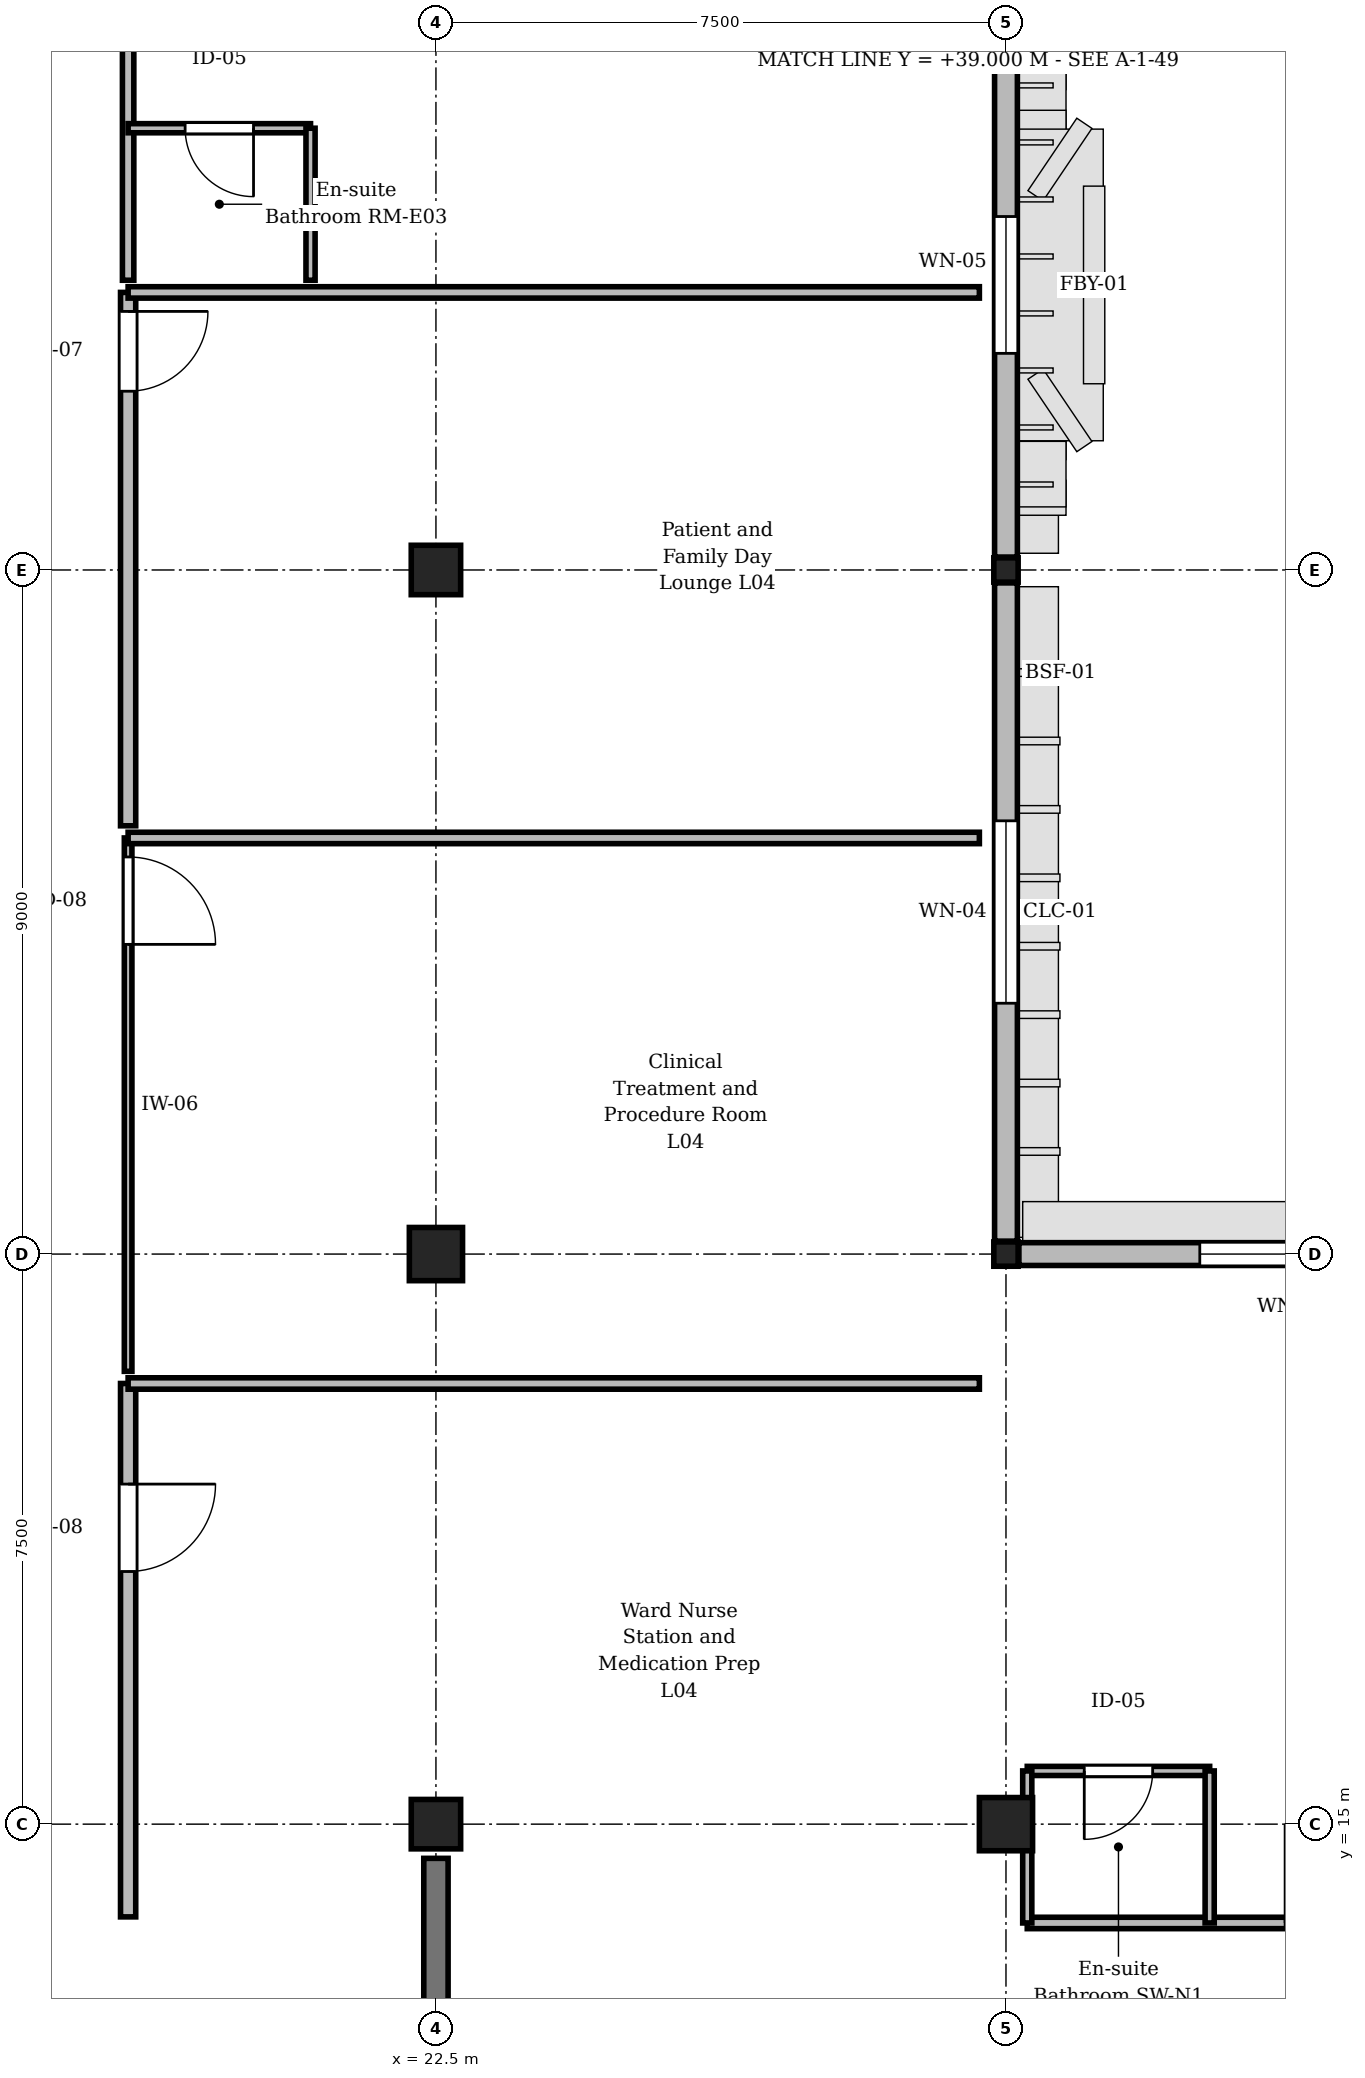
"""IFC4 building model, lengths in metres.
Left out: names, types, materials, properties, quantities, classifications, styles, units other than length and angle.
Written with IfcOpenShell. Run it as: python <this file> out.ifc"""

import sys

from ifc_helpers import new_model, si_unit, direction, frame, frame_2d, origin, origin_2d, place, context, subcontext, project, spatial, rectangle, extrude, element, fill, save


model = new_model("IFC4")
c1 = context("Model", 3, precision=1e-05, world=origin(), true_north=direction((0.0, 1.0)))
c2 = subcontext(c1, "Body", "Model", "MODEL_VIEW")
j1 = project(units=[si_unit("LENGTHUNIT", "METRE"), si_unit("PLANEANGLEUNIT", "RADIAN")], contexts=[c1])
p1 = place(None, origin())
s1 = spatial("IfcSite", under=j1, at=p1, CompositionType="ELEMENT")
p2 = place(p1, origin())
s2 = spatial("IfcBuilding", under=s1, at=p2, CompositionType="ELEMENT")
p3 = place(p2, frame((0.0, 0.0, 17.85)))
s3 = spatial("IfcBuildingStorey", under=s2, at=p3, CompositionType="ELEMENT", Elevation=17.85)
p4 = place(p3, frame((22.5, 15.0, 0.0), z_axis=(0.0, 0.0, 1.0), x_axis=(1.0, 0.0, 0.0)))
e1 = element("IfcColumn", 1, at=p4, inside=s3, PredefinedType="COLUMN", context=c2, shape_type="SweptSolid", body=[
    extrude(rectangle(XDim=0.65, YDim=0.65, at=origin_2d()), origin(), (0.0, 0.0, 1.0), 4.05),
])
p5 = place(p3, frame((22.5, 22.5, 0.0), z_axis=(0.0, 0.0, 1.0), x_axis=(1.0, 0.0, 0.0)))
e2 = element("IfcColumn", 2, at=p5, inside=s3, PredefinedType="COLUMN", context=c2, shape_type="SweptSolid", body=[
    extrude(rectangle(XDim=0.7, YDim=0.7, at=origin_2d()), origin(), (0.0, 0.0, 1.0), 4.05),
])
p6 = place(p3, frame((22.5, 31.5, 0.0), z_axis=(0.0, 0.0, 1.0), x_axis=(1.0, 0.0, 0.0)))
e3 = element("IfcColumn", 3, at=p6, inside=s3, PredefinedType="COLUMN", context=c2, shape_type="SweptSolid", body=[
    extrude(rectangle(XDim=0.65, YDim=0.65, at=origin_2d()), origin(), (0.0, 0.0, 1.0), 4.05),
])
p7 = place(p3, frame((30.0, 15.0, 0.0), z_axis=(0.0, 0.0, 1.0), x_axis=(1.0, 0.0, 0.0)))
e4 = element("IfcColumn", 4, at=p7, inside=s3, PredefinedType="COLUMN", context=c2, shape_type="SweptSolid", body=[
    extrude(rectangle(XDim=0.7, YDim=0.7, at=origin_2d()), origin(), (0.0, 0.0, 1.0), 4.05),
])
for number, where, z_axis, x_axis in (
    (5, (30.0, 22.5, 0.0), (0.0, 0.0, 1.0), (1.0, 0.0, 0.0)),
    (6, (30.0, 31.5, 0.0), (0.0, 0.0, 1.0), (1.0, 0.0, 0.0)),
):
    element("IfcColumn", number, at=place(p3, frame(where, z_axis=z_axis, x_axis=x_axis)), inside=s3, PredefinedType="COLUMN", context=c2, shape_type="SweptSolid", body=[
        extrude(rectangle(XDim=0.32, YDim=0.32, at=origin_2d()), origin(), (0.0, 0.0, 1.0), 4.05),
    ])
p8 = place(p3, frame((22.5, 7.95, 0.0), z_axis=(0.0, 0.0, 1.0), x_axis=(0.0, 1.0, 0.0)))
e7 = element("IfcWall", 7, at=p8, inside=s3, PredefinedType="SHEAR", context=c2, shape_type="SweptSolid", body=[
    extrude(rectangle(XDim=6.6, YDim=0.32, at=frame_2d((3.3, 0.0))), origin(), (0.0, 0.0, 1.0), 3.22),
])
p9 = place(p3, frame((30.0, 31.33, 0.0), z_axis=(0.0, 0.0, 1.0), x_axis=(0.0, -1.0, 0.0)))
e8 = element("IfcWall", 8, at=p9, inside=s3, PredefinedType="STANDARD", context=c2, shape_type="SweptSolid", body=[
    extrude(rectangle(XDim=8.66, YDim=0.3, at=frame_2d((4.33, 0.0))), origin(), (0.0, 0.0, 1.0), 3.22),
])
p10 = place(p9, frame((3.13, 0.0, 0.9)))
e9 = element("IfcOpeningElement", 9, at=p10, cuts=e8, PredefinedType="OPENING", context=c2, shape_type="SweptSolid", body=[
    extrude(rectangle(XDim=2.4, YDim=2.04, at=frame_2d((1.2, 1.02))), frame((0.0, 0.16, 0.0), z_axis=(0.0, -1.0, 0.0), x_axis=(1.0, 0.0, 0.0)), (0.0, 0.0, 1.0), 0.32),
])
p11 = place(p3, frame((30.0, 38.83, 0.0), z_axis=(0.0, 0.0, 1.0), x_axis=(0.0, -1.0, 0.0)))
e10 = element("IfcWall", 10, at=p11, inside=s3, PredefinedType="STANDARD", context=c2, shape_type="SweptSolid", body=[
    extrude(rectangle(XDim=7.16, YDim=0.3, at=frame_2d((3.58, 0.0))), origin(), (0.0, 0.0, 1.0), 3.17),
])
p12 = place(p11, frame((2.68, 0.0, 0.9)))
e11 = element("IfcOpeningElement", 11, at=p12, cuts=e10, PredefinedType="OPENING", context=c2, shape_type="SweptSolid", body=[
    extrude(rectangle(XDim=1.8, YDim=1.99, at=frame_2d((0.9, 0.995))), frame((0.0, 0.16, 0.0), z_axis=(0.0, -1.0, 0.0), x_axis=(1.0, 0.0, 0.0)), (0.0, 0.0, 1.0), 0.32),
])
p13 = place(p3, frame((30.17, 22.5, 0.0), z_axis=(0.0, 0.0, 1.0), x_axis=(1.0, 0.0, 0.0)))
e12 = element("IfcWall", 12, at=p13, inside=s3, PredefinedType="STANDARD", context=c2, shape_type="SweptSolid", body=[
    extrude(rectangle(XDim=7.16, YDim=0.3, at=frame_2d((3.58, 0.0))), origin(), (0.0, 0.0, 1.0), 3.17),
])
p14 = place(p13, frame((2.38, 0.0, 0.9)))
e13 = element("IfcOpeningElement", 13, at=p14, cuts=e12, PredefinedType="OPENING", context=c2, shape_type="SweptSolid", body=[
    extrude(rectangle(XDim=2.4, YDim=1.99, at=frame_2d((1.2, 0.995))), frame((0.0, 0.16, 0.0), z_axis=(0.0, -1.0, 0.0), x_axis=(1.0, 0.0, 0.0)), (0.0, 0.0, 1.0), 0.32),
])
p15 = place(p3, frame((18.45, 20.797, 0.0), z_axis=(0.0, 0.0, 1.0), x_axis=(0.0, -1.0, 0.0)))
e14 = element("IfcWall", 14, at=p15, inside=s3, PredefinedType="STANDARD", context=c2, shape_type="SweptSolid", body=[
    extrude(rectangle(XDim=7.017, YDim=0.2, at=frame_2d((3.509, 0.0))), origin(), (0.0, 0.0, 1.0), 3.755),
])
p16 = place(p15, frame((1.323, 0.0, 0.0)))
e15 = element("IfcOpeningElement", 15, at=p16, cuts=e14, PredefinedType="OPENING", context=c2, shape_type="SweptSolid", body=[
    extrude(rectangle(XDim=1.15, YDim=2.2, at=frame_2d((0.575, 1.1))), frame((0.0, 0.11, 0.0), z_axis=(0.0, -1.0, 0.0), x_axis=(1.0, 0.0, 0.0)), (0.0, 0.0, 1.0), 0.22),
])
p17 = place(p3, frame((18.45, 27.975, 0.0), z_axis=(0.0, 0.0, 1.0), x_axis=(0.0, -1.0, 0.0)))
e16 = element("IfcWall", 16, at=p17, inside=s3, PredefinedType="PARTITIONING", context=c2, shape_type="SweptSolid", body=[
    extrude(rectangle(XDim=7.017, YDim=0.1, at=frame_2d((3.509, 0.0))), origin(), (0.0, 0.0, 1.0), 3.355),
])
p18 = place(p17, frame((0.25, 0.0, 0.0)))
e17 = element("IfcOpeningElement", 17, at=p18, cuts=e16, PredefinedType="OPENING", context=c2, shape_type="SweptSolid", body=[
    extrude(rectangle(XDim=1.15, YDim=2.2, at=frame_2d((0.575, 1.1))), frame((0.0, 0.06, 0.0), z_axis=(0.0, -1.0, 0.0), x_axis=(1.0, 0.0, 0.0)), (0.0, 0.0, 1.0), 0.12),
])
p19 = place(p3, frame((18.45, 35.152, 0.0), z_axis=(0.0, 0.0, 1.0), x_axis=(0.0, -1.0, 0.0)))
e18 = element("IfcWall", 18, at=p19, inside=s3, PredefinedType="STANDARD", context=c2, shape_type="SweptSolid", body=[
    extrude(rectangle(XDim=7.017, YDim=0.2, at=frame_2d((3.509, 0.0))), origin(), (0.0, 0.0, 1.0), 3.355),
])
p20 = place(p19, frame((0.25, 0.0, 0.0)))
e19 = element("IfcOpeningElement", 19, at=p20, cuts=e18, PredefinedType="OPENING", context=c2, shape_type="SweptSolid", body=[
    extrude(rectangle(XDim=1.05, YDim=2.2, at=frame_2d((0.525, 1.1))), frame((0.0, 0.11, 0.0), z_axis=(0.0, -1.0, 0.0), x_axis=(1.0, 0.0, 0.0)), (0.0, 0.0, 1.0), 0.22),
])
p21 = place(p3, frame((18.45, 42.329, 0.0), z_axis=(0.0, 0.0, 1.0), x_axis=(0.0, -1.0, 0.0)))
e20 = element("IfcWall", 20, at=p21, inside=s3, PredefinedType="PARTITIONING", context=c2, shape_type="SweptSolid", body=[
    extrude(rectangle(XDim=7.017, YDim=0.15, at=frame_2d((3.509, 0.0))), origin(), (0.0, 0.0, 1.0), 3.755),
])
p22 = place(p21, frame((0.25, 0.0, 0.0)))
e21 = element("IfcOpeningElement", 21, at=p22, cuts=e20, PredefinedType="OPENING", context=c2, shape_type="SweptSolid", body=[
    extrude(rectangle(XDim=1.35, YDim=2.25, at=frame_2d((0.675, 1.125))), frame((0.0, 0.085, 0.0), z_axis=(0.0, -1.0, 0.0), x_axis=(1.0, 0.0, 0.0)), (0.0, 0.0, 1.0), 0.17),
])
p23 = place(p3, frame((20.85, 37.312, 0.0), z_axis=(0.0, 0.0, 1.0), x_axis=(-1.0, 0.0, 0.0)))
e22 = element("IfcWall", 22, at=p23, inside=s3, PredefinedType="PARTITIONING", context=c2, shape_type="SweptSolid", body=[
    extrude(rectangle(XDim=2.4, YDim=0.12, at=frame_2d((1.2, 0.0))), origin(), (0.0, 0.0, 1.0), 3.755),
])
p24 = place(p23, frame((0.75, 0.0, 0.0)))
e23 = element("IfcOpeningElement", 23, at=p24, cuts=e22, PredefinedType="OPENING", context=c2, shape_type="SweptSolid", body=[
    extrude(rectangle(XDim=0.9, YDim=2.1, at=frame_2d((0.45, 1.05))), frame((0.0, 0.07, 0.0), z_axis=(0.0, -1.0, 0.0), x_axis=(1.0, 0.0, 0.0)), (0.0, 0.0, 1.0), 0.14),
])
p25 = place(p3, frame((20.85, 35.312, 0.0), z_axis=(0.0, 0.0, 1.0), x_axis=(0.0, 1.0, 0.0)))
e24 = element("IfcWall", 24, at=p25, inside=s3, PredefinedType="PARTITIONING", context=c2, shape_type="SweptSolid", body=[
    extrude(rectangle(XDim=2.0, YDim=0.12, at=frame_2d((1.0, 0.0))), origin(), (0.0, 0.0, 1.0), 3.755),
])
p26 = place(p3, frame((30.28, 13.7, 0.0), z_axis=(0.0, 0.0, 1.0), x_axis=(1.0, 0.0, 0.0)))
e25 = element("IfcWall", 25, at=p26, inside=s3, PredefinedType="PARTITIONING", context=c2, shape_type="SweptSolid", body=[
    extrude(rectangle(XDim=9.657, YDim=0.15, at=frame_2d((4.828, 0.0))), origin(), (0.0, 0.0, 1.0), 3.755),
])
p27 = place(p26, frame((3.393, 0.0, 0.0)))
e26 = element("IfcOpeningElement", 26, at=p27, cuts=e25, PredefinedType="OPENING", context=c2, shape_type="SweptSolid", body=[
    extrude(rectangle(XDim=1.3, YDim=2.2, at=frame_2d((0.65, 1.1))), frame((0.0, 0.085, 0.0), z_axis=(0.0, -1.0, 0.0), x_axis=(1.0, 0.0, 0.0)), (0.0, 0.0, 1.0), 0.17),
])
p28 = place(p3, frame((32.68, 15.7, 0.0), z_axis=(0.0, 0.0, 1.0), x_axis=(-1.0, 0.0, 0.0)))
e27 = element("IfcWall", 27, at=p28, inside=s3, PredefinedType="PARTITIONING", context=c2, shape_type="SweptSolid", body=[
    extrude(rectangle(XDim=2.4, YDim=0.12, at=frame_2d((1.2, 0.0))), origin(), (0.0, 0.0, 1.0), 3.755),
])
p29 = place(p28, frame((0.75, 0.0, 0.0)))
e28 = element("IfcOpeningElement", 28, at=p29, cuts=e27, PredefinedType="OPENING", context=c2, shape_type="SweptSolid", body=[
    extrude(rectangle(XDim=0.9, YDim=2.1, at=frame_2d((0.45, 1.05))), frame((0.0, 0.07, 0.0), z_axis=(0.0, -1.0, 0.0), x_axis=(1.0, 0.0, 0.0)), (0.0, 0.0, 1.0), 0.14),
])
p30 = place(p3, frame((32.68, 13.7, 0.0), z_axis=(0.0, 0.0, 1.0), x_axis=(0.0, 1.0, 0.0)))
e29 = element("IfcWall", 29, at=p30, inside=s3, PredefinedType="PARTITIONING", context=c2, shape_type="SweptSolid", body=[
    extrude(rectangle(XDim=2.0, YDim=0.12, at=frame_2d((1.0, 0.0))), origin(), (0.0, 0.0, 1.0), 3.755),
])
for number, where, z_axis, x_axis in (
    (30, (18.45, 20.797, 0.0), (0.0, 0.0, 1.0), (1.0, 0.0, 0.0)),
    (31, (18.45, 27.975, 0.0), (0.0, 0.0, 1.0), (1.0, 0.0, 0.0)),
    (32, (18.45, 35.152, 0.0), (0.0, 0.0, 1.0), (1.0, 0.0, 0.0)),
):
    element("IfcWall", number, at=place(p3, frame(where, z_axis=z_axis, x_axis=x_axis)), inside=s3, PredefinedType="PARTITIONING", context=c2, shape_type="SweptSolid", body=[
        extrude(rectangle(XDim=11.2, YDim=0.15, at=frame_2d((5.6, 0.0))), origin(), (0.0, 0.0, 1.0), 3.755),
    ])
p31 = place(p3, frame((30.28, 13.7, 0.0), z_axis=(0.0, 0.0, 1.0), x_axis=(0.0, 1.0, 0.0)))
e33 = element("IfcWall", 33, at=p31, inside=s3, PredefinedType="PARTITIONING", context=c2, shape_type="SweptSolid", body=[
    extrude(rectangle(XDim=2.0, YDim=0.12, at=frame_2d((1.0, 0.0))), origin(), (0.0, 0.0, 1.0), 3.205),
])
p32 = place(p10, origin())
e34 = element("IfcWindow", 34, at=p32, inside=s3, PartitioningType="SINGLE_PANEL", PredefinedType="WINDOW", context=c2, shape_type="SweptSolid", body=[
    extrude(rectangle(XDim=2.4, YDim=2.04, at=frame_2d((1.2, 1.02))), frame((0.0, 0.03, 0.0), z_axis=(0.0, -1.0, 0.0), x_axis=(1.0, 0.0, 0.0)), (0.0, 0.0, 1.0), 0.06),
])
fill(e9, e34)
p33 = place(p12, origin())
e35 = element("IfcWindow", 35, at=p33, inside=s3, PartitioningType="SINGLE_PANEL", PredefinedType="WINDOW", context=c2, shape_type="SweptSolid", body=[
    extrude(rectangle(XDim=1.8, YDim=1.99, at=frame_2d((0.9, 0.995))), frame((0.0, 0.03, 0.0), z_axis=(0.0, -1.0, 0.0), x_axis=(1.0, 0.0, 0.0)), (0.0, 0.0, 1.0), 0.06),
])
fill(e11, e35)
p34 = place(p14, origin())
e36 = element("IfcWindow", 36, at=p34, inside=s3, PartitioningType="SINGLE_PANEL", PredefinedType="WINDOW", context=c2, shape_type="SweptSolid", body=[
    extrude(rectangle(XDim=2.4, YDim=1.99, at=frame_2d((1.2, 0.995))), frame((0.0, 0.03, 0.0), z_axis=(0.0, -1.0, 0.0), x_axis=(1.0, 0.0, 0.0)), (0.0, 0.0, 1.0), 0.06),
])
fill(e13, e36)
p35 = place(p16, origin())
e37 = element("IfcDoor", 37, at=p35, inside=s3, OperationType="SINGLE_SWING_LEFT", PredefinedType="DOOR", context=c2, shape_type="SweptSolid", body=[
    extrude(rectangle(XDim=1.15, YDim=2.2, at=frame_2d((0.575, 1.1))), frame((0.0, 0.025, 0.0), z_axis=(0.0, -1.0, 0.0), x_axis=(1.0, 0.0, 0.0)), (0.0, 0.0, 1.0), 0.05),
])
fill(e15, e37)
p36 = place(p18, origin())
e38 = element("IfcDoor", 38, at=p36, inside=s3, OperationType="SINGLE_SWING_RIGHT", PredefinedType="DOOR", context=c2, shape_type="SweptSolid", body=[
    extrude(rectangle(XDim=1.15, YDim=2.2, at=frame_2d((0.575, 1.1))), frame((0.0, 0.025, 0.0), z_axis=(0.0, -1.0, 0.0), x_axis=(1.0, 0.0, 0.0)), (0.0, 0.0, 1.0), 0.05),
])
fill(e17, e38)
p37 = place(p20, origin())
e39 = element("IfcDoor", 39, at=p37, inside=s3, OperationType="SINGLE_SWING_LEFT", PredefinedType="DOOR", context=c2, shape_type="SweptSolid", body=[
    extrude(rectangle(XDim=1.05, YDim=2.2, at=frame_2d((0.525, 1.1))), frame((0.0, 0.025, 0.0), z_axis=(0.0, -1.0, 0.0), x_axis=(1.0, 0.0, 0.0)), (0.0, 0.0, 1.0), 0.05),
])
fill(e19, e39)
p38 = place(p24, origin())
e40 = element("IfcDoor", 40, at=p38, inside=s3, OperationType="SINGLE_SWING_LEFT", PredefinedType="DOOR", context=c2, shape_type="SweptSolid", body=[
    extrude(rectangle(XDim=0.9, YDim=2.1, at=frame_2d((0.45, 1.05))), frame((0.0, 0.025, 0.0), z_axis=(0.0, -1.0, 0.0), x_axis=(1.0, 0.0, 0.0)), (0.0, 0.0, 1.0), 0.05),
])
fill(e23, e40)
p39 = place(p27, origin())
e41 = element("IfcDoor", 41, at=p39, inside=s3, OperationType="SINGLE_SWING_LEFT", PredefinedType="DOOR", context=c2, shape_type="SweptSolid", body=[
    extrude(rectangle(XDim=1.3, YDim=2.2, at=frame_2d((0.65, 1.1))), frame((0.0, 0.025, 0.0), z_axis=(0.0, -1.0, 0.0), x_axis=(1.0, 0.0, 0.0)), (0.0, 0.0, 1.0), 0.05),
])
fill(e26, e41)
p40 = place(p29, origin())
e42 = element("IfcDoor", 42, at=p40, inside=s3, OperationType="SINGLE_SWING_RIGHT", PredefinedType="DOOR", context=c2, shape_type="SweptSolid", body=[
    extrude(rectangle(XDim=0.9, YDim=2.1, at=frame_2d((0.45, 1.05))), frame((0.0, 0.025, 0.0), z_axis=(0.0, -1.0, 0.0), x_axis=(1.0, 0.0, 0.0)), (0.0, 0.0, 1.0), 0.05),
])
fill(e28, e42)
save(model, sys.argv[1])
